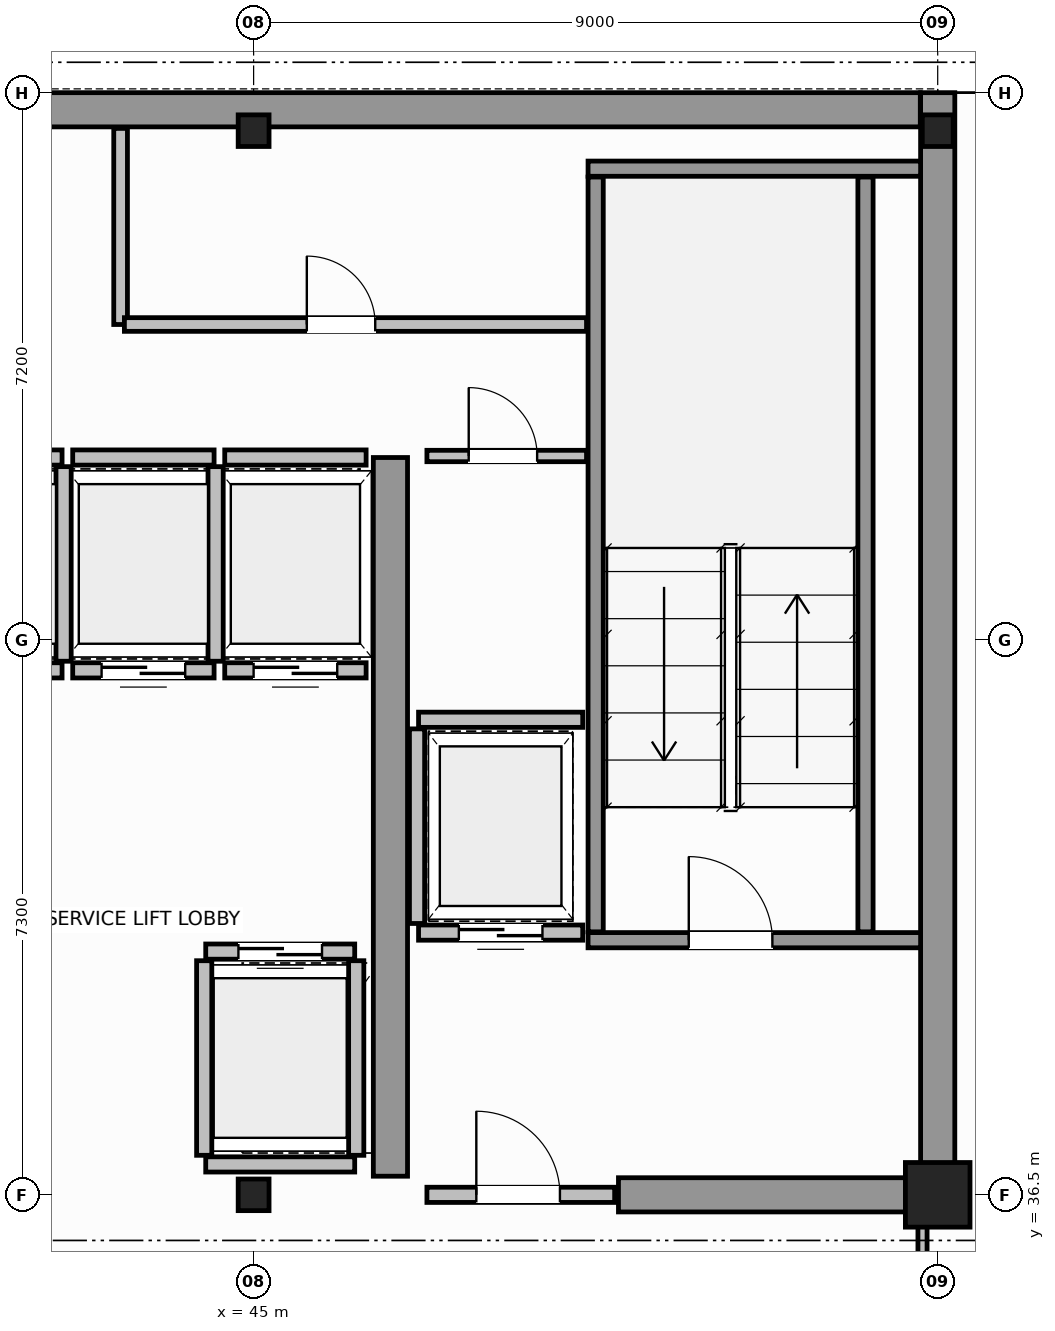
"""IFC4 building model, lengths in metres.
Left out: names, types, materials, properties, quantities, classifications, styles, units other than length and angle.
Written with IfcOpenShell. Run it as: python <this file> out.ifc"""

import sys

from ifc_helpers import new_model, si_unit, direction, frame, frame_2d, origin, origin_2d, place, context, subcontext, project, spatial, rectangle, i_section, extrude, source, transform, mapped, element, fill, save


model = new_model("IFC4")
c1 = context("Model", 3, precision=1e-05, world=origin(), true_north=direction((0.0, 1.0)))
c2 = subcontext(c1, "Body", "Model", "MODEL_VIEW")
j1 = project(units=[si_unit("LENGTHUNIT", "METRE"), si_unit("PLANEANGLEUNIT", "RADIAN")], contexts=[c1])
p1 = place(None, origin())
s1 = spatial("IfcSite", under=j1, at=p1, CompositionType="ELEMENT")
p2 = place(p1, origin())
s2 = spatial("IfcBuilding", under=s1, at=p2, CompositionType="ELEMENT")
p3 = place(p2, frame((0.0, 0.0, 291.6)))
s3 = spatial("IfcBuildingStorey", under=s2, at=p3, CompositionType="ELEMENT", Elevation=291.6)
m1 = source(origin(), c2, "Body", "SweptSolid", [
    extrude(i_section(OverallWidth=0.406, OverallDepth=0.416, WebThickness=0.03, FlangeThickness=0.042, FilletRadius=0.015, at=origin_2d()), origin(), (0.0, 0.0, 1.0), 3.8),
])
p4 = place(p3, frame((45.0, 36.5, 0.0), z_axis=(0.0, 0.0, 1.0), x_axis=(1.0, 0.0, 0.0)))
e1 = element("IfcColumn", 1, at=p4, inside=s3, PredefinedType="COLUMN", context=c2, shape_type="MappedRepresentation", body=[
    mapped(m1, transform((0.0, 0.0, 0.0), scale=1.0)),
])
m2 = source(origin(), c2, "Body", "SweptSolid", [
    extrude(rectangle(XDim=0.85, YDim=0.85, at=origin_2d()), origin(), (0.0, 0.0, 1.0), 3.8),
])
p5 = place(p3, frame((54.0, 36.5, 0.0), z_axis=(0.0, 0.0, 1.0), x_axis=(1.0, 0.0, 0.0)))
e2 = element("IfcColumn", 2, at=p5, inside=s3, PredefinedType="COLUMN", context=c2, shape_type="MappedRepresentation", body=[
    mapped(m2, transform((0.0, 0.0, 0.0), scale=1.0)),
])
for number, where, z_axis, x_axis in (
    (3, (45.0, 50.5, 0.0), (0.0, 0.0, 1.0), (1.0, 0.0, 0.0)),
    (4, (54.0, 50.5, 0.0), (0.0, 0.0, 1.0), (1.0, 0.0, 0.0)),
):
    element("IfcColumn", number, at=place(p3, frame(where, z_axis=z_axis, x_axis=x_axis)), inside=s3, PredefinedType="COLUMN", context=c2, shape_type="MappedRepresentation", body=[
        mapped(m1, transform((0.0, 0.0, 0.0), scale=1.0)),
    ])
p6 = place(p3, frame((34.002, 50.775, 0.0), z_axis=(0.0, 0.0, 1.0), x_axis=(1.0, 0.0, 0.0)))
e5 = element("IfcWall", 5, at=p6, inside=s3, PredefinedType="SHEAR", context=c2, shape_type="SweptSolid", body=[
    extrude(rectangle(XDim=19.769, YDim=0.45, at=frame_2d((9.885, 0.0))), origin(), (0.0, 0.0, 1.0), 3.8),
])
p7 = place(p3, frame((54.0, 36.5, 0.0), z_axis=(0.0, 0.0, 1.0), x_axis=(0.0, 1.0, 0.0)))
e6 = element("IfcWall", 6, at=p7, inside=s3, PredefinedType="SHEAR", context=c2, shape_type="SweptSolid", body=[
    extrude(rectangle(XDim=14.5, YDim=0.45, at=frame_2d((7.25, 0.0))), origin(), (0.0, 0.0, 1.0), 3.8),
])
p8 = place(p3, frame((49.8, 36.5, 0.0), z_axis=(0.0, 0.0, 1.0), x_axis=(1.0, 0.0, 0.0)))
e7 = element("IfcWall", 7, at=p8, inside=s3, PredefinedType="SHEAR", context=c2, shape_type="SweptSolid", body=[
    extrude(rectangle(XDim=3.955, YDim=0.45, at=frame_2d((1.978, 0.0))), origin(), (0.0, 0.0, 1.0), 2.58),
])
p9 = place(p3, frame((46.8, 36.745, 0.0), z_axis=(0.0, 0.0, 1.0), x_axis=(0.0, 1.0, 0.0)))
e8 = element("IfcWall", 8, at=p9, inside=s3, PredefinedType="SHEAR", context=c2, shape_type="SweptSolid", body=[
    extrude(rectangle(XDim=9.455, YDim=0.45, at=frame_2d((4.728, 0.0))), origin(), (0.0, 0.0, 1.0), 3.8),
])
p10 = place(p3, frame((49.4, 39.85, 0.0), z_axis=(0.0, 0.0, 1.0), x_axis=(1.0, 0.0, 0.0)))
e9 = element("IfcWall", 9, at=p10, inside=s3, PredefinedType="SOLIDWALL", context=c2, shape_type="SweptSolid", body=[
    extrude(rectangle(XDim=4.375, YDim=0.2, at=frame_2d((2.188, 0.0))), origin(), (0.0, 0.0, 1.0), 3.8),
])
p11 = place(p10, frame((1.325, 0.0, 0.0)))
e10 = element("IfcOpeningElement", 10, at=p11, cuts=e9, PredefinedType="OPENING", context=c2, shape_type="SweptSolid", body=[
    extrude(rectangle(XDim=1.1, YDim=2.15, at=frame_2d((0.55, 1.075))), frame((0.0, 0.11, 0.0), z_axis=(0.0, -1.0, 0.0), x_axis=(1.0, 0.0, 0.0)), (0.0, 0.0, 1.0), 0.22),
])
p12 = place(p3, frame((49.4, 50.0, 0.0), z_axis=(0.0, 0.0, 1.0), x_axis=(1.0, 0.0, 0.0)))
e11 = element("IfcWall", 11, at=p12, inside=s3, PredefinedType="SOLIDWALL", context=c2, shape_type="SweptSolid", body=[
    extrude(rectangle(XDim=4.375, YDim=0.2, at=frame_2d((2.188, 0.0))), origin(), (0.0, 0.0, 1.0), 3.8),
])
for number, where, z_axis, x_axis in (
    (12, (49.5, 39.96, 0.0), (0.0, 0.0, 1.0), (0.0, 1.0, 0.0)),
    (13, (53.05, 39.96, 0.0), (0.0, 0.0, 1.0), (0.0, 1.0, 0.0)),
):
    element("IfcWall", number, at=place(p3, frame(where, z_axis=z_axis, x_axis=x_axis)), inside=s3, PredefinedType="SOLIDWALL", context=c2, shape_type="SweptSolid", body=[
        extrude(rectangle(XDim=9.93, YDim=0.2, at=frame_2d((4.965, 0.0))), origin(), (0.0, 0.0, 1.0), 3.8),
    ])
p13 = place(p3, frame((47.28, 36.5, 0.0), z_axis=(0.0, 0.0, 1.0), x_axis=(1.0, 0.0, 0.0)))
e14 = element("IfcWall", 14, at=p13, inside=s3, PredefinedType="SOLIDWALL", context=c2, shape_type="SweptSolid", body=[
    extrude(rectangle(XDim=2.47, YDim=0.2, at=frame_2d((1.235, 0.0))), origin(), (0.0, 0.0, 1.0), 2.57),
])
p14 = place(p13, frame((0.65, 0.0, 0.0)))
e15 = element("IfcOpeningElement", 15, at=p14, cuts=e14, PredefinedType="OPENING", context=c2, shape_type="SweptSolid", body=[
    extrude(rectangle(XDim=1.1, YDim=2.15, at=frame_2d((0.55, 1.075))), frame((0.0, 0.11, 0.0), z_axis=(0.0, -1.0, 0.0), x_axis=(1.0, 0.0, 0.0)), (0.0, 0.0, 1.0), 0.22),
])
p15 = place(p3, frame((44.37, 39.7, 0.0), z_axis=(0.0, 0.0, 1.0), x_axis=(1.0, 0.0, 0.0)))
e16 = element("IfcWall", 16, at=p15, inside=s3, PredefinedType="SOLIDWALL", context=c2, shape_type="SweptSolid", body=[
    extrude(rectangle(XDim=1.96, YDim=0.2, at=frame_2d((0.98, 0.0))), origin(), (0.0, 0.0, 1.0), 3.58),
])
p16 = place(p15, frame((0.43, 0.0, 0.0)))
e17 = element("IfcOpeningElement", 17, at=p16, cuts=e16, PredefinedType="OPENING", context=c2, shape_type="SweptSolid", body=[
    extrude(rectangle(XDim=1.1, YDim=2.15, at=frame_2d((0.55, 1.075))), frame((0.0, 0.11, 0.0), z_axis=(0.0, -1.0, 0.0), x_axis=(1.0, 0.0, 0.0)), (0.0, 0.0, 1.0), 0.22),
])
p17 = place(p3, frame((44.37, 36.9, 0.0), z_axis=(0.0, 0.0, 1.0), x_axis=(1.0, 0.0, 0.0)))
e18 = element("IfcWall", 18, at=p17, inside=s3, PredefinedType="SOLIDWALL", context=c2, shape_type="SweptSolid", body=[
    extrude(rectangle(XDim=1.96, YDim=0.2, at=frame_2d((0.98, 0.0))), origin(), (0.0, 0.0, 1.0), 2.57),
])
for number, where, z_axis, x_axis in (
    (19, (44.35, 37.02, 0.0), (0.0, 0.0, 1.0), (0.0, 1.0, 0.0)),
    (20, (46.35, 37.02, 0.0), (0.0, 0.0, 1.0), (0.0, 1.0, 0.0)),
):
    element("IfcWall", number, at=place(p3, frame(where, z_axis=z_axis, x_axis=x_axis)), inside=s3, PredefinedType="SOLIDWALL", context=c2, shape_type="SweptSolid", body=[
        extrude(rectangle(XDim=2.56, YDim=0.2, at=frame_2d((1.28, 0.0))), origin(), (0.0, 0.0, 1.0), 3.58),
    ])
p18 = place(p3, frame((40.62, 43.4, 0.0), z_axis=(0.0, 0.0, 1.0), x_axis=(1.0, 0.0, 0.0)))
e21 = element("IfcWall", 21, at=p18, inside=s3, PredefinedType="SOLIDWALL", context=c2, shape_type="SweptSolid", body=[
    extrude(rectangle(XDim=1.86, YDim=0.2, at=frame_2d((0.93, 0.0))), origin(), (0.0, 0.0, 1.0), 3.58),
])
p19 = place(p18, frame((0.38, 0.0, 0.0)))
e22 = element("IfcOpeningElement", 22, at=p19, cuts=e21, PredefinedType="OPENING", context=c2, shape_type="SweptSolid", body=[
    extrude(rectangle(XDim=1.1, YDim=2.15, at=frame_2d((0.55, 1.075))), frame((0.0, 0.11, 0.0), z_axis=(0.0, -1.0, 0.0), x_axis=(1.0, 0.0, 0.0)), (0.0, 0.0, 1.0), 0.22),
])
p20 = place(p3, frame((40.62, 46.2, 0.0), z_axis=(0.0, 0.0, 1.0), x_axis=(1.0, 0.0, 0.0)))
e23 = element("IfcWall", 23, at=p20, inside=s3, PredefinedType="SOLIDWALL", context=c2, shape_type="SweptSolid", body=[
    extrude(rectangle(XDim=1.86, YDim=0.2, at=frame_2d((0.93, 0.0))), origin(), (0.0, 0.0, 1.0), 3.58),
])
p21 = place(p3, frame((42.5, 43.52, 0.0), z_axis=(0.0, 0.0, 1.0), x_axis=(0.0, 1.0, 0.0)))
e24 = element("IfcWall", 24, at=p21, inside=s3, PredefinedType="SOLIDWALL", context=c2, shape_type="SweptSolid", body=[
    extrude(rectangle(XDim=2.56, YDim=0.2, at=frame_2d((1.28, 0.0))), origin(), (0.0, 0.0, 1.0), 3.58),
])
p22 = place(p3, frame((42.62, 43.4, 0.0), z_axis=(0.0, 0.0, 1.0), x_axis=(1.0, 0.0, 0.0)))
e25 = element("IfcWall", 25, at=p22, inside=s3, PredefinedType="SOLIDWALL", context=c2, shape_type="SweptSolid", body=[
    extrude(rectangle(XDim=1.86, YDim=0.2, at=frame_2d((0.93, 0.0))), origin(), (0.0, 0.0, 1.0), 3.58),
])
p23 = place(p22, frame((0.38, 0.0, 0.0)))
e26 = element("IfcOpeningElement", 26, at=p23, cuts=e25, PredefinedType="OPENING", context=c2, shape_type="SweptSolid", body=[
    extrude(rectangle(XDim=1.1, YDim=2.15, at=frame_2d((0.55, 1.075))), frame((0.0, 0.11, 0.0), z_axis=(0.0, -1.0, 0.0), x_axis=(1.0, 0.0, 0.0)), (0.0, 0.0, 1.0), 0.22),
])
p24 = place(p3, frame((42.62, 46.2, 0.0), z_axis=(0.0, 0.0, 1.0), x_axis=(1.0, 0.0, 0.0)))
e27 = element("IfcWall", 27, at=p24, inside=s3, PredefinedType="SOLIDWALL", context=c2, shape_type="SweptSolid", body=[
    extrude(rectangle(XDim=1.86, YDim=0.2, at=frame_2d((0.93, 0.0))), origin(), (0.0, 0.0, 1.0), 3.58),
])
p25 = place(p3, frame((44.5, 43.52, 0.0), z_axis=(0.0, 0.0, 1.0), x_axis=(0.0, 1.0, 0.0)))
e28 = element("IfcWall", 28, at=p25, inside=s3, PredefinedType="SOLIDWALL", context=c2, shape_type="SweptSolid", body=[
    extrude(rectangle(XDim=2.56, YDim=0.2, at=frame_2d((1.28, 0.0))), origin(), (0.0, 0.0, 1.0), 3.58),
])
p26 = place(p3, frame((44.62, 43.4, 0.0), z_axis=(0.0, 0.0, 1.0), x_axis=(1.0, 0.0, 0.0)))
e29 = element("IfcWall", 29, at=p26, inside=s3, PredefinedType="SOLIDWALL", context=c2, shape_type="SweptSolid", body=[
    extrude(rectangle(XDim=1.86, YDim=0.2, at=frame_2d((0.93, 0.0))), origin(), (0.0, 0.0, 1.0), 3.58),
])
p27 = place(p26, frame((0.38, 0.0, 0.0)))
e30 = element("IfcOpeningElement", 30, at=p27, cuts=e29, PredefinedType="OPENING", context=c2, shape_type="SweptSolid", body=[
    extrude(rectangle(XDim=1.1, YDim=2.15, at=frame_2d((0.55, 1.075))), frame((0.0, 0.11, 0.0), z_axis=(0.0, -1.0, 0.0), x_axis=(1.0, 0.0, 0.0)), (0.0, 0.0, 1.0), 0.22),
])
p28 = place(p3, frame((44.62, 46.2, 0.0), z_axis=(0.0, 0.0, 1.0), x_axis=(1.0, 0.0, 0.0)))
e31 = element("IfcWall", 31, at=p28, inside=s3, PredefinedType="SOLIDWALL", context=c2, shape_type="SweptSolid", body=[
    extrude(rectangle(XDim=1.86, YDim=0.2, at=frame_2d((0.93, 0.0))), origin(), (0.0, 0.0, 1.0), 3.58),
])
p29 = place(p3, frame((47.17, 39.95, 0.0), z_axis=(0.0, 0.0, 1.0), x_axis=(1.0, 0.0, 0.0)))
e32 = element("IfcWall", 32, at=p29, inside=s3, PredefinedType="SOLIDWALL", context=c2, shape_type="SweptSolid", body=[
    extrude(rectangle(XDim=2.16, YDim=0.2, at=frame_2d((1.08, 0.0))), origin(), (0.0, 0.0, 1.0), 3.58),
])
p30 = place(p29, frame((0.53, 0.0, 0.0)))
e33 = element("IfcOpeningElement", 33, at=p30, cuts=e32, PredefinedType="OPENING", context=c2, shape_type="SweptSolid", body=[
    extrude(rectangle(XDim=1.1, YDim=2.15, at=frame_2d((0.55, 1.075))), frame((0.0, 0.11, 0.0), z_axis=(0.0, -1.0, 0.0), x_axis=(1.0, 0.0, 0.0)), (0.0, 0.0, 1.0), 0.22),
])
p31 = place(p3, frame((47.17, 42.75, 0.0), z_axis=(0.0, 0.0, 1.0), x_axis=(1.0, 0.0, 0.0)))
e34 = element("IfcWall", 34, at=p31, inside=s3, PredefinedType="SOLIDWALL", context=c2, shape_type="SweptSolid", body=[
    extrude(rectangle(XDim=2.16, YDim=0.2, at=frame_2d((1.08, 0.0))), origin(), (0.0, 0.0, 1.0), 3.58),
])
p32 = place(p3, frame((47.15, 40.07, 0.0), z_axis=(0.0, 0.0, 1.0), x_axis=(0.0, 1.0, 0.0)))
e35 = element("IfcWall", 35, at=p32, inside=s3, PredefinedType="SOLIDWALL", context=c2, shape_type="SweptSolid", body=[
    extrude(rectangle(XDim=2.56, YDim=0.2, at=frame_2d((1.28, 0.0))), origin(), (0.0, 0.0, 1.0), 3.58),
])
p33 = place(p3, frame((47.28, 46.22, 0.0), z_axis=(0.0, 0.0, 1.0), x_axis=(1.0, 0.0, 0.0)))
e36 = element("IfcWall", 36, at=p33, inside=s3, PredefinedType="PARTITIONING", context=c2, shape_type="SweptSolid", body=[
    extrude(rectangle(XDim=2.1, YDim=0.15, at=frame_2d((1.05, 0.0))), origin(), (0.0, 0.0, 1.0), 3.58),
])
p34 = place(p33, frame((0.55, 0.0, 0.0)))
e37 = element("IfcOpeningElement", 37, at=p34, cuts=e36, PredefinedType="OPENING", context=c2, shape_type="SweptSolid", body=[
    extrude(rectangle(XDim=0.9, YDim=2.1, at=frame_2d((0.45, 1.05))), frame((0.0, 0.085, 0.0), z_axis=(0.0, -1.0, 0.0), x_axis=(1.0, 0.0, 0.0)), (0.0, 0.0, 1.0), 0.17),
])
p35 = place(p3, frame((43.25, 47.95, 0.0), z_axis=(0.0, 0.0, 1.0), x_axis=(0.0, 1.0, 0.0)))
e38 = element("IfcWall", 38, at=p35, inside=s3, PredefinedType="PLUMBINGWALL", context=c2, shape_type="SweptSolid", body=[
    extrude(rectangle(XDim=2.58, YDim=0.18, at=frame_2d((1.29, 0.0))), origin(), (0.0, 0.0, 1.0), 3.58),
])
p36 = place(p3, frame((43.3, 47.95, 0.0), z_axis=(0.0, 0.0, 1.0), x_axis=(1.0, 0.0, 0.0)))
e39 = element("IfcWall", 39, at=p36, inside=s3, PredefinedType="PLUMBINGWALL", context=c2, shape_type="SweptSolid", body=[
    extrude(rectangle(XDim=6.08, YDim=0.18, at=frame_2d((3.04, 0.0))), origin(), (0.0, 0.0, 1.0), 3.58),
])
p37 = place(p36, frame((2.4, 0.0, 0.0)))
e40 = element("IfcOpeningElement", 40, at=p37, cuts=e39, PredefinedType="OPENING", context=c2, shape_type="SweptSolid", body=[
    extrude(rectangle(XDim=0.9, YDim=2.15, at=frame_2d((0.45, 1.075))), frame((0.0, 0.1, 0.0), z_axis=(0.0, -1.0, 0.0), x_axis=(1.0, 0.0, 0.0)), (0.0, 0.0, 1.0), 0.2),
])
p38 = place(p3, frame((53.8, 34.0, 0.0), z_axis=(0.0, 0.0, 1.0), x_axis=(0.0, 1.0, 0.0)))
e41 = element("IfcWall", 41, at=p38, inside=s3, PredefinedType="PARTITIONING", context=c2, shape_type="SweptSolid", body=[
    extrude(rectangle(XDim=2.44, YDim=0.12, at=frame_2d((1.22, 0.0))), origin(), (0.0, 0.0, 1.0), 3.58),
])
p39 = place(p38, frame((0.7, 0.0, 0.0)))
e42 = element("IfcOpeningElement", 42, at=p39, cuts=e41, PredefinedType="OPENING", context=c2, shape_type="SweptSolid", body=[
    extrude(rectangle(XDim=0.9, YDim=2.15, at=frame_2d((0.45, 1.075))), frame((0.0, 0.07, 0.0), z_axis=(0.0, -1.0, 0.0), x_axis=(1.0, 0.0, 0.0)), (0.0, 0.0, 1.0), 0.14),
])
m3 = source(origin(), c2, "Body", "SweptSolid", [
    extrude(rectangle(XDim=1.1, YDim=2.15, at=frame_2d((0.55, 1.075))), frame((0.0, 0.025, 0.0), z_axis=(0.0, -1.0, 0.0), x_axis=(1.0, 0.0, 0.0)), (0.0, 0.0, 1.0), 0.05),
])
p40 = place(p11, origin())
e43 = element("IfcDoor", 43, at=p40, inside=s3, OperationType="SINGLE_SWING_RIGHT", PredefinedType="DOOR", context=c2, shape_type="MappedRepresentation", body=[
    mapped(m3, transform((0.0, 0.0, 0.0), scale=1.0)),
])
fill(e10, e43)
p41 = place(p14, origin())
e44 = element("IfcDoor", 44, at=p41, inside=s3, OperationType="SINGLE_SWING_LEFT", PredefinedType="DOOR", context=c2, shape_type="MappedRepresentation", body=[
    mapped(m3, transform((0.0, 0.0, 0.0), scale=1.0)),
])
fill(e15, e44)
p42 = place(p16, origin())
e45 = element("IfcDoor", 45, at=p42, inside=s3, OperationType="DOUBLE_DOOR_SLIDING", PredefinedType="DOOR", context=c2, shape_type="MappedRepresentation", body=[
    mapped(m3, transform((0.0, 0.0, 0.0), scale=1.0)),
])
fill(e17, e45)
p43 = place(p23, origin())
e46 = element("IfcDoor", 46, at=p43, inside=s3, OperationType="DOUBLE_DOOR_SLIDING", PredefinedType="DOOR", context=c2, shape_type="MappedRepresentation", body=[
    mapped(m3, transform((0.0, 0.0, 0.0), scale=1.0)),
])
fill(e26, e46)
p44 = place(p27, origin())
e47 = element("IfcDoor", 47, at=p44, inside=s3, OperationType="DOUBLE_DOOR_SLIDING", PredefinedType="DOOR", context=c2, shape_type="MappedRepresentation", body=[
    mapped(m3, transform((0.0, 0.0, 0.0), scale=1.0)),
])
fill(e30, e47)
p45 = place(p30, origin())
e48 = element("IfcDoor", 48, at=p45, inside=s3, OperationType="DOUBLE_DOOR_SLIDING", PredefinedType="DOOR", context=c2, shape_type="MappedRepresentation", body=[
    mapped(m3, transform((0.0, 0.0, 0.0), scale=1.0)),
])
fill(e33, e48)
m4 = source(origin(), c2, "Body", "SweptSolid", [
    extrude(rectangle(XDim=0.9, YDim=2.1, at=frame_2d((0.45, 1.05))), frame((0.0, 0.025, 0.0), z_axis=(0.0, -1.0, 0.0), x_axis=(1.0, 0.0, 0.0)), (0.0, 0.0, 1.0), 0.05),
])
p46 = place(p34, origin())
e49 = element("IfcDoor", 49, at=p46, inside=s3, OperationType="SINGLE_SWING_RIGHT", PredefinedType="DOOR", context=c2, shape_type="MappedRepresentation", body=[
    mapped(m4, transform((0.0, 0.0, 0.0), scale=1.0)),
])
fill(e37, e49)
m5 = source(origin(), c2, "Body", "SweptSolid", [
    extrude(rectangle(XDim=0.9, YDim=2.15, at=frame_2d((0.45, 1.075))), frame((0.0, 0.025, 0.0), z_axis=(0.0, -1.0, 0.0), x_axis=(1.0, 0.0, 0.0)), (0.0, 0.0, 1.0), 0.05),
])
p47 = place(p37, origin())
e50 = element("IfcDoor", 50, at=p47, inside=s3, OperationType="SINGLE_SWING_RIGHT", PredefinedType="DOOR", context=c2, shape_type="MappedRepresentation", body=[
    mapped(m5, transform((0.0, 0.0, 0.0), scale=1.0)),
])
fill(e40, e50)
save(model, sys.argv[1])
